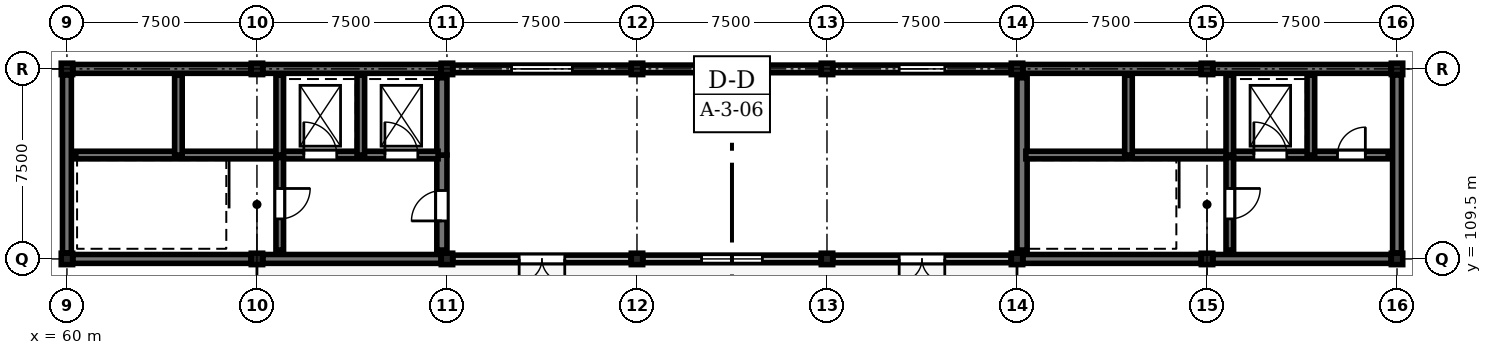
"""IFC4 building model, lengths in metres.
Left out: names, types, materials, properties, quantities, classifications, styles, units other than length and angle.
Written with IfcOpenShell. Run it as: python <this file> out.ifc"""

import sys

from ifc_helpers import new_model, si_unit, direction, frame, frame_2d, origin, origin_2d, place, context, subcontext, project, spatial, rectangle, extrude, element, fill, save


model = new_model("IFC4")
c1 = context("Model", 3, precision=1e-05, world=origin(), true_north=direction((0.0, 1.0)))
c2 = subcontext(c1, "Body", "Model", "MODEL_VIEW")
j1 = project(units=[si_unit("LENGTHUNIT", "METRE"), si_unit("PLANEANGLEUNIT", "RADIAN")], contexts=[c1])
p1 = place(None, origin())
s1 = spatial("IfcSite", under=j1, at=p1, CompositionType="ELEMENT")
p2 = place(p1, origin())
s2 = spatial("IfcBuilding", under=s1, at=p2, CompositionType="ELEMENT")
p3 = place(p2, frame((0.0, 0.0, 21.9)))
s3 = spatial("IfcBuildingStorey", under=s2, at=p3, CompositionType="ELEMENT", Elevation=21.9)
for number, where, z_axis, x_axis in (
    (1, (60.0, 109.5, 0.0), (0.0, 0.0, 1.0), (1.0, 0.0, 0.0)),
    (2, (60.0, 117.0, 0.0), (0.0, 0.0, 1.0), (1.0, 0.0, 0.0)),
    (3, (67.5, 109.5, 0.0), (0.0, 0.0, 1.0), (1.0, 0.0, 0.0)),
    (4, (67.5, 117.0, 0.0), (0.0, 0.0, 1.0), (1.0, 0.0, 0.0)),
    (5, (75.0, 109.5, 0.0), (0.0, 0.0, 1.0), (1.0, 0.0, 0.0)),
    (6, (75.0, 117.0, 0.0), (0.0, 0.0, 1.0), (1.0, 0.0, 0.0)),
    (7, (82.5, 109.5, 0.0), (0.0, 0.0, 1.0), (1.0, 0.0, 0.0)),
    (8, (82.5, 117.0, 0.0), (0.0, 0.0, 1.0), (1.0, 0.0, 0.0)),
    (9, (90.0, 109.5, 0.0), (0.0, 0.0, 1.0), (1.0, 0.0, 0.0)),
    (10, (90.0, 117.0, 0.0), (0.0, 0.0, 1.0), (1.0, 0.0, 0.0)),
    (11, (97.5, 109.5, 0.0), (0.0, 0.0, 1.0), (1.0, 0.0, 0.0)),
    (12, (97.5, 117.0, 0.0), (0.0, 0.0, 1.0), (1.0, 0.0, 0.0)),
    (13, (105.0, 109.5, 0.0), (0.0, 0.0, 1.0), (1.0, 0.0, 0.0)),
    (14, (105.0, 117.0, 0.0), (0.0, 0.0, 1.0), (1.0, 0.0, 0.0)),
    (15, (112.5, 109.5, 0.0), (0.0, 0.0, 1.0), (1.0, 0.0, 0.0)),
    (16, (112.5, 117.0, 0.0), (0.0, 0.0, 1.0), (1.0, 0.0, 0.0)),
):
    element("IfcColumn", number, at=place(p3, frame(where, z_axis=z_axis, x_axis=x_axis)), inside=s3, PredefinedType="COLUMN", context=c2, shape_type="SweptSolid", body=[
        extrude(rectangle(XDim=0.45, YDim=0.45, at=origin_2d()), origin(), (0.0, 0.0, 1.0), 4.05),
    ])
for number, where, z_axis, x_axis in (
    (17, (67.265, 109.5, 0.0), (0.0, 0.0, 1.0), (-1.0, 0.0, 0.0)),
    (18, (60.235, 117.0, 0.0), (0.0, 0.0, 1.0), (1.0, 0.0, 0.0)),
    (19, (60.0, 109.735, 0.0), (0.0, 0.0, 1.0), (0.0, 1.0, 0.0)),
    (20, (74.765, 109.5, 0.0), (0.0, 0.0, 1.0), (-1.0, 0.0, 0.0)),
    (21, (67.735, 117.0, 0.0), (0.0, 0.0, 1.0), (1.0, 0.0, 0.0)),
):
    element("IfcWall", number, at=place(p3, frame(where, z_axis=z_axis, x_axis=x_axis)), inside=s3, PredefinedType="SHEAR", context=c2, shape_type="SweptSolid", body=[
        extrude(rectangle(XDim=7.03, YDim=0.35, at=frame_2d((3.515, 0.0))), origin(), (0.0, 0.0, 1.0), 3.77),
    ])
p4 = place(p3, frame((82.265, 109.5, 0.0), z_axis=(0.0, 0.0, 1.0), x_axis=(-1.0, 0.0, 0.0)))
e22 = element("IfcWall", 22, at=p4, inside=s3, PredefinedType="STANDARD", context=c2, shape_type="SweptSolid", body=[
    extrude(rectangle(XDim=7.03, YDim=0.3, at=frame_2d((3.515, 0.0))), origin(), (0.0, 0.0, 1.0), 3.77),
])
p5 = place(p4, frame((2.615, 0.0, 0.0)))
e23 = element("IfcOpeningElement", 23, at=p5, cuts=e22, PredefinedType="OPENING", context=c2, shape_type="SweptSolid", body=[
    extrude(rectangle(XDim=1.8, YDim=2.4, at=frame_2d((0.9, 1.2))), frame((0.0, 0.16, 0.0), z_axis=(0.0, -1.0, 0.0), x_axis=(1.0, 0.0, 0.0)), (0.0, 0.0, 1.0), 0.32),
])
p6 = place(p3, frame((75.235, 117.0, 0.0), z_axis=(0.0, 0.0, 1.0), x_axis=(1.0, 0.0, 0.0)))
e24 = element("IfcWall", 24, at=p6, inside=s3, PredefinedType="STANDARD", context=c2, shape_type="SweptSolid", body=[
    extrude(rectangle(XDim=7.03, YDim=0.3, at=frame_2d((3.515, 0.0))), origin(), (0.0, 0.0, 1.0), 3.77),
])
p7 = place(p6, frame((2.315, 0.0, 0.9)))
e25 = element("IfcOpeningElement", 25, at=p7, cuts=e24, PredefinedType="OPENING", context=c2, shape_type="SweptSolid", body=[
    extrude(rectangle(XDim=2.4, YDim=2.1, at=frame_2d((1.2, 1.05))), frame((0.0, 0.16, 0.0), z_axis=(0.0, -1.0, 0.0), x_axis=(1.0, 0.0, 0.0)), (0.0, 0.0, 1.0), 0.32),
])
p8 = place(p3, frame((89.765, 109.5, 0.0), z_axis=(0.0, 0.0, 1.0), x_axis=(-1.0, 0.0, 0.0)))
e26 = element("IfcWall", 26, at=p8, inside=s3, PredefinedType="STANDARD", context=c2, shape_type="SweptSolid", body=[
    extrude(rectangle(XDim=7.03, YDim=0.3, at=frame_2d((3.515, 0.0))), origin(), (0.0, 0.0, 1.0), 3.77),
])
p9 = place(p8, frame((2.315, 0.0, 0.9)))
e27 = element("IfcOpeningElement", 27, at=p9, cuts=e26, PredefinedType="OPENING", context=c2, shape_type="SweptSolid", body=[
    extrude(rectangle(XDim=2.4, YDim=2.1, at=frame_2d((1.2, 1.05))), frame((0.0, 0.16, 0.0), z_axis=(0.0, -1.0, 0.0), x_axis=(1.0, 0.0, 0.0)), (0.0, 0.0, 1.0), 0.32),
])
p10 = place(p3, frame((82.735, 117.0, 0.0), z_axis=(0.0, 0.0, 1.0), x_axis=(1.0, 0.0, 0.0)))
e28 = element("IfcWall", 28, at=p10, inside=s3, PredefinedType="STANDARD", context=c2, shape_type="SweptSolid", body=[
    extrude(rectangle(XDim=7.03, YDim=0.3, at=frame_2d((3.515, 0.0))), origin(), (0.0, 0.0, 1.0), 3.77),
])
p11 = place(p10, frame((2.715, 0.0, 0.9)))
e29 = element("IfcOpeningElement", 29, at=p11, cuts=e28, PredefinedType="OPENING", context=c2, shape_type="SweptSolid", body=[
    extrude(rectangle(XDim=1.6, YDim=1.95, at=frame_2d((0.8, 0.975))), frame((0.0, 0.16, 0.0), z_axis=(0.0, -1.0, 0.0), x_axis=(1.0, 0.0, 0.0)), (0.0, 0.0, 1.0), 0.32),
])
p12 = place(p3, frame((97.265, 109.5, 0.0), z_axis=(0.0, 0.0, 1.0), x_axis=(-1.0, 0.0, 0.0)))
e30 = element("IfcWall", 30, at=p12, inside=s3, PredefinedType="STANDARD", context=c2, shape_type="SweptSolid", body=[
    extrude(rectangle(XDim=7.03, YDim=0.3, at=frame_2d((3.515, 0.0))), origin(), (0.0, 0.0, 1.0), 3.77),
])
p13 = place(p12, frame((2.615, 0.0, 0.0)))
e31 = element("IfcOpeningElement", 31, at=p13, cuts=e30, PredefinedType="OPENING", context=c2, shape_type="SweptSolid", body=[
    extrude(rectangle(XDim=1.8, YDim=2.4, at=frame_2d((0.9, 1.2))), frame((0.0, 0.16, 0.0), z_axis=(0.0, -1.0, 0.0), x_axis=(1.0, 0.0, 0.0)), (0.0, 0.0, 1.0), 0.32),
])
p14 = place(p3, frame((90.235, 117.0, 0.0), z_axis=(0.0, 0.0, 1.0), x_axis=(1.0, 0.0, 0.0)))
e32 = element("IfcWall", 32, at=p14, inside=s3, PredefinedType="STANDARD", context=c2, shape_type="SweptSolid", body=[
    extrude(rectangle(XDim=7.03, YDim=0.3, at=frame_2d((3.515, 0.0))), origin(), (0.0, 0.0, 1.0), 3.77),
])
p15 = place(p14, frame((2.615, 0.0, 0.9)))
e33 = element("IfcOpeningElement", 33, at=p15, cuts=e32, PredefinedType="OPENING", context=c2, shape_type="SweptSolid", body=[
    extrude(rectangle(XDim=1.8, YDim=1.95, at=frame_2d((0.9, 0.975))), frame((0.0, 0.16, 0.0), z_axis=(0.0, -1.0, 0.0), x_axis=(1.0, 0.0, 0.0)), (0.0, 0.0, 1.0), 0.32),
])
for number, where, z_axis, x_axis in (
    (34, (104.765, 109.5, 0.0), (0.0, 0.0, 1.0), (-1.0, 0.0, 0.0)),
    (35, (97.735, 117.0, 0.0), (0.0, 0.0, 1.0), (1.0, 0.0, 0.0)),
    (36, (112.265, 109.5, 0.0), (0.0, 0.0, 1.0), (-1.0, 0.0, 0.0)),
    (37, (105.235, 117.0, 0.0), (0.0, 0.0, 1.0), (1.0, 0.0, 0.0)),
    (38, (112.5, 116.765, 0.0), (0.0, 0.0, 1.0), (0.0, -1.0, 0.0)),
):
    element("IfcWall", number, at=place(p3, frame(where, z_axis=z_axis, x_axis=x_axis)), inside=s3, PredefinedType="SHEAR", context=c2, shape_type="SweptSolid", body=[
        extrude(rectangle(XDim=7.03, YDim=0.35, at=frame_2d((3.515, 0.0))), origin(), (0.0, 0.0, 1.0), 3.77),
    ])
p16 = place(p3, frame((74.8, 109.85, 0.0), z_axis=(0.0, 0.0, 1.0), x_axis=(0.0, 1.0, 0.0)))
e39 = element("IfcWall", 39, at=p16, inside=s3, PredefinedType="SHEAR", context=c2, shape_type="SweptSolid", body=[
    extrude(rectangle(XDim=3.75, YDim=0.4, at=frame_2d((1.875, 0.0))), origin(), (0.0, 0.0, 1.0), 3.77),
])
p17 = place(p16, frame((1.15, 0.0, 0.0)))
e40 = element("IfcOpeningElement", 40, at=p17, cuts=e39, PredefinedType="OPENING", context=c2, shape_type="SweptSolid", body=[
    extrude(rectangle(XDim=1.2, YDim=2.25, at=frame_2d((0.6, 1.125))), frame((0.0, 0.21, 0.0), z_axis=(0.0, -1.0, 0.0), x_axis=(1.0, 0.0, 0.0)), (0.0, 0.0, 1.0), 0.42),
])
p18 = place(p3, frame((74.8, 113.6, 0.0), z_axis=(0.0, 0.0, 1.0), x_axis=(0.0, 1.0, 0.0)))
e41 = element("IfcWall", 41, at=p18, inside=s3, PredefinedType="SHEAR", context=c2, shape_type="SweptSolid", body=[
    extrude(rectangle(XDim=3.05, YDim=0.4, at=frame_2d((1.525, 0.0))), origin(), (0.0, 0.0, 1.0), 3.77),
])
p19 = place(p3, frame((60.35, 113.6, 0.0), z_axis=(0.0, 0.0, 1.0), x_axis=(1.0, 0.0, 0.0)))
e42 = element("IfcWall", 42, at=p19, inside=s3, PredefinedType="SHEAR", context=c2, shape_type="SweptSolid", body=[
    extrude(rectangle(XDim=8.05, YDim=0.3, at=frame_2d((4.025, 0.0))), origin(), (0.0, 0.0, 1.0), 3.77),
])
p20 = place(p3, frame((68.4, 113.6, 0.0), z_axis=(0.0, 0.0, 1.0), x_axis=(1.0, 0.0, 0.0)))
e43 = element("IfcWall", 43, at=p20, inside=s3, PredefinedType="SHEAR", context=c2, shape_type="SweptSolid", body=[
    extrude(rectangle(XDim=6.25, YDim=0.3, at=frame_2d((3.125, 0.0))), origin(), (0.0, 0.0, 1.0), 3.77),
])
p21 = place(p20, frame((0.95, 0.0, 0.0)))
e44 = element("IfcOpeningElement", 44, at=p21, cuts=e43, PredefinedType="OPENING", context=c2, shape_type="SweptSolid", body=[
    extrude(rectangle(XDim=1.3, YDim=2.2, at=frame_2d((0.65, 1.1))), frame((0.0, 0.16, 0.0), z_axis=(0.0, -1.0, 0.0), x_axis=(1.0, 0.0, 0.0)), (0.0, 0.0, 1.0), 0.32),
])
p22 = place(p20, frame((4.15, 0.0, 0.0)))
e45 = element("IfcOpeningElement", 45, at=p22, cuts=e43, PredefinedType="OPENING", context=c2, shape_type="SweptSolid", body=[
    extrude(rectangle(XDim=1.3, YDim=2.2, at=frame_2d((0.65, 1.1))), frame((0.0, 0.16, 0.0), z_axis=(0.0, -1.0, 0.0), x_axis=(1.0, 0.0, 0.0)), (0.0, 0.0, 1.0), 0.32),
])
p23 = place(p3, frame((68.4, 113.5, 0.0), z_axis=(0.0, 0.0, 1.0), x_axis=(0.0, -1.0, 0.0)))
e46 = element("IfcWall", 46, at=p23, inside=s3, PredefinedType="SHEAR", context=c2, shape_type="SweptSolid", body=[
    extrude(rectangle(XDim=3.65, YDim=0.3, at=frame_2d((1.825, 0.0))), origin(), (0.0, 0.0, 1.0), 3.77),
])
p24 = place(p23, frame((1.22, 0.0, 0.0)))
e47 = element("IfcOpeningElement", 47, at=p24, cuts=e46, PredefinedType="OPENING", context=c2, shape_type="SweptSolid", body=[
    extrude(rectangle(XDim=1.2, YDim=2.25, at=frame_2d((0.6, 1.125))), frame((0.0, 0.16, 0.0), z_axis=(0.0, -1.0, 0.0), x_axis=(1.0, 0.0, 0.0)), (0.0, 0.0, 1.0), 0.32),
])
for number, where, z_axis, x_axis in (
    (48, (64.4, 113.6, 0.0), (0.0, 0.0, 1.0), (0.0, 1.0, 0.0)),
    (49, (68.4, 113.6, 0.0), (0.0, 0.0, 1.0), (0.0, 1.0, 0.0)),
    (50, (71.6, 113.6, 0.0), (0.0, 0.0, 1.0), (0.0, 1.0, 0.0)),
):
    element("IfcWall", number, at=place(p3, frame(where, z_axis=z_axis, x_axis=x_axis)), inside=s3, PredefinedType="SHEAR", context=c2, shape_type="SweptSolid", body=[
        extrude(rectangle(XDim=3.15, YDim=0.3, at=frame_2d((1.575, 0.0))), origin(), (0.0, 0.0, 1.0), 3.77),
    ])
p25 = place(p3, frame((97.7, 109.85, 0.0), z_axis=(0.0, 0.0, 1.0), x_axis=(0.0, 1.0, 0.0)))
e51 = element("IfcWall", 51, at=p25, inside=s3, PredefinedType="SHEAR", context=c2, shape_type="SweptSolid", body=[
    extrude(rectangle(XDim=6.8, YDim=0.4, at=frame_2d((3.4, 0.0))), origin(), (0.0, 0.0, 1.0), 3.77),
])
p26 = place(p3, frame((97.85, 113.6, 0.0), z_axis=(0.0, 0.0, 1.0), x_axis=(1.0, 0.0, 0.0)))
e52 = element("IfcWall", 52, at=p26, inside=s3, PredefinedType="SHEAR", context=c2, shape_type="SweptSolid", body=[
    extrude(rectangle(XDim=8.05, YDim=0.3, at=frame_2d((4.025, 0.0))), origin(), (0.0, 0.0, 1.0), 3.77),
])
p27 = place(p3, frame((105.9, 113.6, 0.0), z_axis=(0.0, 0.0, 1.0), x_axis=(1.0, 0.0, 0.0)))
e53 = element("IfcWall", 53, at=p27, inside=s3, PredefinedType="SHEAR", context=c2, shape_type="SweptSolid", body=[
    extrude(rectangle(XDim=6.25, YDim=0.3, at=frame_2d((3.125, 0.0))), origin(), (0.0, 0.0, 1.0), 3.77),
])
p28 = place(p27, frame((0.95, 0.0, 0.0)))
e54 = element("IfcOpeningElement", 54, at=p28, cuts=e53, PredefinedType="OPENING", context=c2, shape_type="SweptSolid", body=[
    extrude(rectangle(XDim=1.3, YDim=2.2, at=frame_2d((0.65, 1.1))), frame((0.0, 0.16, 0.0), z_axis=(0.0, -1.0, 0.0), x_axis=(1.0, 0.0, 0.0)), (0.0, 0.0, 1.0), 0.32),
])
p29 = place(p27, frame((4.25, 0.0, 0.0)))
e55 = element("IfcOpeningElement", 55, at=p29, cuts=e53, PredefinedType="OPENING", context=c2, shape_type="SweptSolid", body=[
    extrude(rectangle(XDim=1.1, YDim=2.2, at=frame_2d((0.55, 1.1))), frame((0.0, 0.16, 0.0), z_axis=(0.0, -1.0, 0.0), x_axis=(1.0, 0.0, 0.0)), (0.0, 0.0, 1.0), 0.32),
])
p30 = place(p3, frame((105.9, 113.5, 0.0), z_axis=(0.0, 0.0, 1.0), x_axis=(0.0, -1.0, 0.0)))
e56 = element("IfcWall", 56, at=p30, inside=s3, PredefinedType="SHEAR", context=c2, shape_type="SweptSolid", body=[
    extrude(rectangle(XDim=3.65, YDim=0.3, at=frame_2d((1.825, 0.0))), origin(), (0.0, 0.0, 1.0), 3.77),
])
p31 = place(p30, frame((1.22, 0.0, 0.0)))
e57 = element("IfcOpeningElement", 57, at=p31, cuts=e56, PredefinedType="OPENING", context=c2, shape_type="SweptSolid", body=[
    extrude(rectangle(XDim=1.2, YDim=2.25, at=frame_2d((0.6, 1.125))), frame((0.0, 0.16, 0.0), z_axis=(0.0, -1.0, 0.0), x_axis=(1.0, 0.0, 0.0)), (0.0, 0.0, 1.0), 0.32),
])
for number, where, z_axis, x_axis in (
    (58, (101.9, 113.6, 0.0), (0.0, 0.0, 1.0), (0.0, 1.0, 0.0)),
    (59, (105.9, 113.6, 0.0), (0.0, 0.0, 1.0), (0.0, 1.0, 0.0)),
    (60, (109.1, 113.6, 0.0), (0.0, 0.0, 1.0), (0.0, 1.0, 0.0)),
):
    element("IfcWall", number, at=place(p3, frame(where, z_axis=z_axis, x_axis=x_axis)), inside=s3, PredefinedType="SHEAR", context=c2, shape_type="SweptSolid", body=[
        extrude(rectangle(XDim=3.15, YDim=0.3, at=frame_2d((1.575, 0.0))), origin(), (0.0, 0.0, 1.0), 3.77),
    ])
p32 = place(p5, origin())
e61 = element("IfcDoor", 61, at=p32, inside=s3, OperationType="DOUBLE_DOOR_SINGLE_SWING", PredefinedType="DOOR", context=c2, shape_type="SweptSolid", body=[
    extrude(rectangle(XDim=1.8, YDim=2.4, at=frame_2d((0.9, 1.2))), frame((0.0, 0.025, 0.0), z_axis=(0.0, -1.0, 0.0), x_axis=(1.0, 0.0, 0.0)), (0.0, 0.0, 1.0), 0.05),
])
fill(e23, e61)
p33 = place(p7, origin())
e62 = element("IfcWindow", 62, at=p33, inside=s3, PartitioningType="SINGLE_PANEL", PredefinedType="WINDOW", context=c2, shape_type="SweptSolid", body=[
    extrude(rectangle(XDim=2.4, YDim=2.1, at=frame_2d((1.2, 1.05))), frame((0.0, 0.03, 0.0), z_axis=(0.0, -1.0, 0.0), x_axis=(1.0, 0.0, 0.0)), (0.0, 0.0, 1.0), 0.06),
])
fill(e25, e62)
p34 = place(p9, origin())
e63 = element("IfcWindow", 63, at=p34, inside=s3, PartitioningType="SINGLE_PANEL", PredefinedType="WINDOW", context=c2, shape_type="SweptSolid", body=[
    extrude(rectangle(XDim=2.4, YDim=2.1, at=frame_2d((1.2, 1.05))), frame((0.0, 0.03, 0.0), z_axis=(0.0, -1.0, 0.0), x_axis=(1.0, 0.0, 0.0)), (0.0, 0.0, 1.0), 0.06),
])
fill(e27, e63)
p35 = place(p11, origin())
e64 = element("IfcWindow", 64, at=p35, inside=s3, PartitioningType="SINGLE_PANEL", PredefinedType="WINDOW", context=c2, shape_type="SweptSolid", body=[
    extrude(rectangle(XDim=1.6, YDim=1.95, at=frame_2d((0.8, 0.975))), frame((0.0, 0.03, 0.0), z_axis=(0.0, -1.0, 0.0), x_axis=(1.0, 0.0, 0.0)), (0.0, 0.0, 1.0), 0.06),
])
fill(e29, e64)
p36 = place(p13, origin())
e65 = element("IfcDoor", 65, at=p36, inside=s3, OperationType="DOUBLE_DOOR_SINGLE_SWING", PredefinedType="DOOR", context=c2, shape_type="SweptSolid", body=[
    extrude(rectangle(XDim=1.8, YDim=2.4, at=frame_2d((0.9, 1.2))), frame((0.0, 0.025, 0.0), z_axis=(0.0, -1.0, 0.0), x_axis=(1.0, 0.0, 0.0)), (0.0, 0.0, 1.0), 0.05),
])
fill(e31, e65)
p37 = place(p15, origin())
e66 = element("IfcWindow", 66, at=p37, inside=s3, PartitioningType="SINGLE_PANEL", PredefinedType="WINDOW", context=c2, shape_type="SweptSolid", body=[
    extrude(rectangle(XDim=1.8, YDim=1.95, at=frame_2d((0.9, 0.975))), frame((0.0, 0.03, 0.0), z_axis=(0.0, -1.0, 0.0), x_axis=(1.0, 0.0, 0.0)), (0.0, 0.0, 1.0), 0.06),
])
fill(e33, e66)
p38 = place(p17, origin())
e67 = element("IfcDoor", 67, at=p38, inside=s3, OperationType="SINGLE_SWING_LEFT", PredefinedType="DOOR", context=c2, shape_type="SweptSolid", body=[
    extrude(rectangle(XDim=1.2, YDim=2.25, at=frame_2d((0.6, 1.125))), frame((0.0, 0.025, 0.0), z_axis=(0.0, -1.0, 0.0), x_axis=(1.0, 0.0, 0.0)), (0.0, 0.0, 1.0), 0.05),
])
fill(e40, e67)
p39 = place(p21, origin())
e68 = element("IfcDoor", 68, at=p39, inside=s3, OperationType="DOUBLE_DOOR_SLIDING", PredefinedType="DOOR", context=c2, shape_type="SweptSolid", body=[
    extrude(rectangle(XDim=1.3, YDim=2.2, at=frame_2d((0.65, 1.1))), frame((0.0, 0.025, 0.0), z_axis=(0.0, -1.0, 0.0), x_axis=(1.0, 0.0, 0.0)), (0.0, 0.0, 1.0), 0.05),
])
fill(e44, e68)
p40 = place(p22, origin())
e69 = element("IfcDoor", 69, at=p40, inside=s3, OperationType="DOUBLE_DOOR_SLIDING", PredefinedType="DOOR", context=c2, shape_type="SweptSolid", body=[
    extrude(rectangle(XDim=1.3, YDim=2.2, at=frame_2d((0.65, 1.1))), frame((0.0, 0.025, 0.0), z_axis=(0.0, -1.0, 0.0), x_axis=(1.0, 0.0, 0.0)), (0.0, 0.0, 1.0), 0.05),
])
fill(e45, e69)
p41 = place(p24, origin())
e70 = element("IfcDoor", 70, at=p41, inside=s3, OperationType="SINGLE_SWING_LEFT", PredefinedType="DOOR", context=c2, shape_type="SweptSolid", body=[
    extrude(rectangle(XDim=1.2, YDim=2.25, at=frame_2d((0.6, 1.125))), frame((0.0, 0.025, 0.0), z_axis=(0.0, -1.0, 0.0), x_axis=(1.0, 0.0, 0.0)), (0.0, 0.0, 1.0), 0.05),
])
fill(e47, e70)
p42 = place(p28, origin())
e71 = element("IfcDoor", 71, at=p42, inside=s3, OperationType="DOUBLE_DOOR_SLIDING", PredefinedType="DOOR", context=c2, shape_type="SweptSolid", body=[
    extrude(rectangle(XDim=1.3, YDim=2.2, at=frame_2d((0.65, 1.1))), frame((0.0, 0.025, 0.0), z_axis=(0.0, -1.0, 0.0), x_axis=(1.0, 0.0, 0.0)), (0.0, 0.0, 1.0), 0.05),
])
fill(e54, e71)
p43 = place(p29, origin())
e72 = element("IfcDoor", 72, at=p43, inside=s3, OperationType="SINGLE_SWING_RIGHT", PredefinedType="DOOR", context=c2, shape_type="SweptSolid", body=[
    extrude(rectangle(XDim=1.1, YDim=2.2, at=frame_2d((0.55, 1.1))), frame((0.0, 0.025, 0.0), z_axis=(0.0, -1.0, 0.0), x_axis=(1.0, 0.0, 0.0)), (0.0, 0.0, 1.0), 0.05),
])
fill(e55, e72)
p44 = place(p31, origin())
e73 = element("IfcDoor", 73, at=p44, inside=s3, OperationType="SINGLE_SWING_LEFT", PredefinedType="DOOR", context=c2, shape_type="SweptSolid", body=[
    extrude(rectangle(XDim=1.2, YDim=2.25, at=frame_2d((0.6, 1.125))), frame((0.0, 0.025, 0.0), z_axis=(0.0, -1.0, 0.0), x_axis=(1.0, 0.0, 0.0)), (0.0, 0.0, 1.0), 0.05),
])
fill(e57, e73)
save(model, sys.argv[1])
